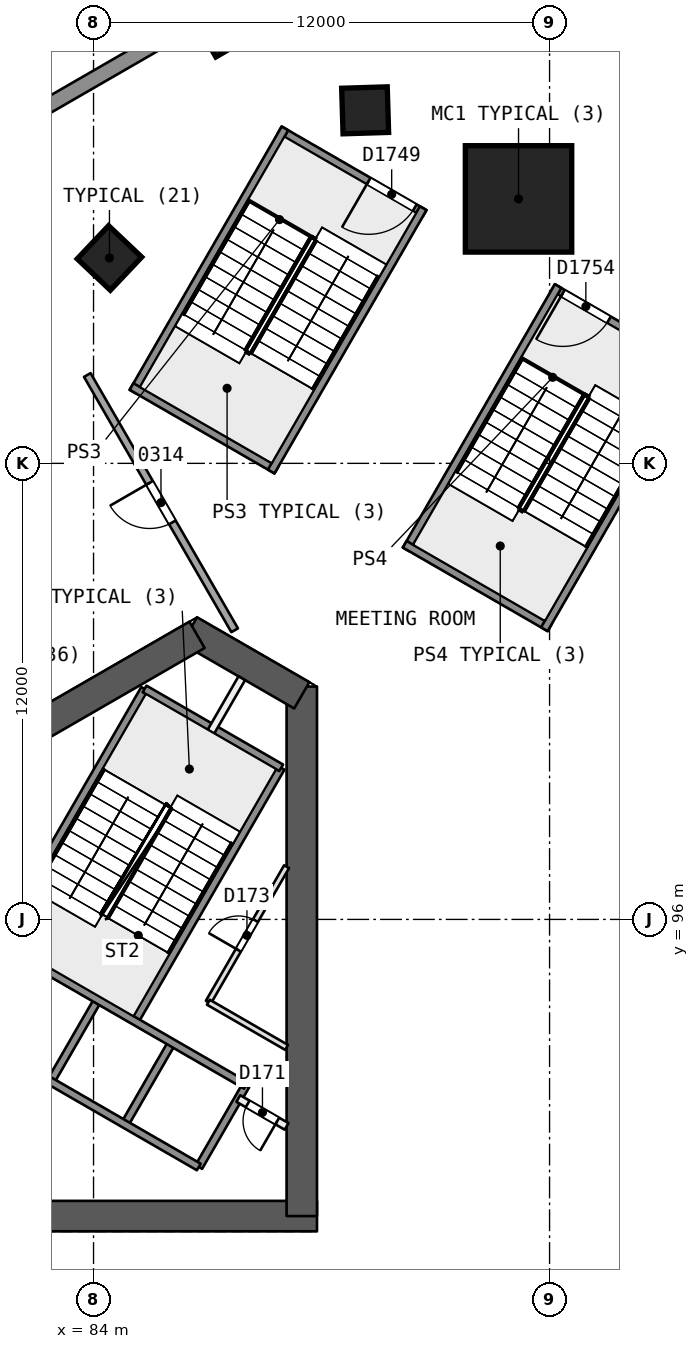
"""IFC4 building model, lengths in metres.
Left out: names, types, materials, properties, quantities, classifications, styles, units other than length and angle.
Written with IfcOpenShell. Run it as: python <this file> out.ifc"""

import sys

from ifc_helpers import new_model, si_unit, direction, frame, frame_2d, origin, origin_2d, place, context, subcontext, project, spatial, rectangle, extrude, element, fill, save


model = new_model("IFC4")
c1 = context("Model", 3, precision=1e-05, world=origin(), true_north=direction((0.0, 1.0)))
c2 = subcontext(c1, "Body", "Model", "MODEL_VIEW")
j1 = project(units=[si_unit("LENGTHUNIT", "METRE"), si_unit("PLANEANGLEUNIT", "RADIAN")], contexts=[c1])
p1 = place(None, origin())
s1 = spatial("IfcSite", under=j1, at=p1, CompositionType="ELEMENT")
p2 = place(p1, origin())
s2 = spatial("IfcBuilding", under=s1, at=p2, CompositionType="ELEMENT")
p3 = place(p2, frame((0.0, 0.0, 20.4)))
s3 = spatial("IfcBuildingStorey", under=s2, at=p3, CompositionType="ELEMENT", Elevation=20.4)
p4 = place(p3, frame((79.731, 88.194, 0.0), z_axis=(0.0, 0.0, 1.0), x_axis=(1.0, 0.0, 0.0)))
e1 = element("IfcWall", 1, at=p4, inside=s3, PredefinedType="SHEAR", context=c2, shape_type="SweptSolid", body=[
    extrude(rectangle(XDim=10.149, YDim=0.8, at=frame_2d((5.074, 0.0))), origin(), (0.0, 0.0, 1.0), 5.0),
])
p5 = place(p4, frame((0.719, 0.0, 0.0)))
e2 = element("IfcOpeningElement", 2, at=p5, cuts=e1, PredefinedType="OPENING", context=c2, shape_type="SweptSolid", body=[
    extrude(rectangle(XDim=1.2, YDim=2.1, at=frame_2d((0.6, 1.05))), frame((0.0, 0.411, 0.0), z_axis=(0.0, -1.0, 0.0), x_axis=(1.0, 0.0, 0.0)), (0.0, 0.0, 1.0), 0.821),
])
p6 = place(p3, frame((89.48, 88.194, 0.0), z_axis=(0.0, 0.0, 1.0), x_axis=(0.0, 1.0, 0.0)))
e3 = element("IfcWall", 3, at=p6, inside=s3, PredefinedType="SHEAR", context=c2, shape_type="SweptSolid", body=[
    extrude(rectangle(XDim=13.933, YDim=0.8, at=frame_2d((6.967, 0.0))), origin(), (0.0, 0.0, 1.0), 5.0),
])
p7 = place(p3, frame((89.48, 101.897, 0.0), z_axis=(0.0, 0.0, 1.0), x_axis=(-0.866034355626, 0.499984494636, 0.0)))
e4 = element("IfcWall", 4, at=p7, inside=s3, PredefinedType="SHEAR", context=c2, shape_type="SweptSolid", body=[
    extrude(rectangle(XDim=3.414, YDim=0.8, at=frame_2d((1.707, 0.0))), origin(), (0.0, 0.0, 1.0), 5.0),
])
p8 = place(p3, frame((86.723, 103.488, 0.0), z_axis=(0.0, 0.0, 1.0), x_axis=(-0.866032504327, -0.499987701298, 0.0)))
e5 = element("IfcWall", 5, at=p8, inside=s3, PredefinedType="SHEAR", context=c2, shape_type="SweptSolid", body=[
    extrude(rectangle(XDim=14.102, YDim=0.8, at=frame_2d((7.051, 0.0))), origin(), (0.0, 0.0, 1.0), 5.0),
])
p9 = place(p3, frame((95.205, 114.995, 0.0), z_axis=(-0.017616042888, -0.030449891307, 0.999381048025), x_axis=(0.500455871665, 0.865047050552, 0.035178414512)))
e6 = element("IfcColumn", 6, at=p9, inside=s3, PredefinedType="COLUMN", context=c2, shape_type="SweptSolid", body=[
    extrude(rectangle(XDim=2.8, YDim=2.8, at=origin_2d()), origin(), (0.0, 0.0, 1.0), 5.003),
])
p10 = place(p3, frame((84.429, 113.438, 0.0), z_axis=(-0.008346006845, -0.02816167222, 0.999568539115), x_axis=(0.865361094771, 0.500694642662, 0.021331911915)))
e7 = element("IfcColumn", 7, at=p10, inside=s3, PredefinedType="COLUMN", context=c2, shape_type="SweptSolid", body=[
    extrude(rectangle(XDim=1.2, YDim=1.2, at=origin_2d()), origin(), (0.0, 0.0, 1.0), 5.002),
])
p11 = place(p3, frame((91.165, 117.327, 0.0), z_axis=(-0.015029655569, -0.032011214459, 0.999374500176), x_axis=(0.917798988767, -0.397043875333, 0.001085024723)))
e8 = element("IfcColumn", 8, at=p11, inside=s3, PredefinedType="COLUMN", context=c2, shape_type="SweptSolid", body=[
    extrude(rectangle(XDim=1.2, YDim=1.2, at=origin_2d()), origin(), (0.0, 0.0, 1.0), 5.003),
])
p12 = place(p3, frame((87.348, 119.172, 0.0), z_axis=(0.0, 0.0, 1.0), x_axis=(0.866025403784, 0.5, 0.0)))
e9 = element("IfcColumn", 9, at=p12, inside=s3, PredefinedType="COLUMN", context=c2, shape_type="SweptSolid", body=[
    extrude(rectangle(XDim=0.7, YDim=0.7, at=origin_2d()), origin(), (0.0, 0.0, 1.0), 5.0),
])
p13 = place(p3, frame((87.714, 103.608, 0.0), z_axis=(0.0, 0.0, 1.0), x_axis=(-0.500002221596, 0.866024121142, 0.0)))
e10 = element("IfcWall", 10, at=p13, inside=s3, PredefinedType="PARTITIONING", context=c2, shape_type="SweptSolid", body=[
    extrude(rectangle(XDim=7.755, YDim=0.2, at=frame_2d((3.878, 0.0))), origin(), (0.0, 0.0, 1.0), 4.5),
])
p14 = place(p13, frame((3.278, 0.0, 0.0)))
e11 = element("IfcOpeningElement", 11, at=p14, cuts=e10, PredefinedType="OPENING", context=c2, shape_type="SweptSolid", body=[
    extrude(rectangle(XDim=1.2, YDim=2.4, at=frame_2d((0.6, 1.2))), frame((0.0, 0.11, 0.0), z_axis=(0.0, -1.0, 0.0), x_axis=(1.0, 0.0, 0.0)), (0.0, 0.0, 1.0), 0.221),
])
p15 = place(p3, frame((26.66, 85.0, 0.0), z_axis=(0.0, 0.0, 1.0), x_axis=(0.866025599265, 0.499999661418, 0.0)))
e12 = element("IfcWall", 12, at=p15, inside=s3, PredefinedType="SOLIDWALL", context=c2, shape_type="SweptSolid", body=[
    extrude(rectangle(XDim=78.727, YDim=0.4, at=frame_2d((39.364, 0.0))), origin(), (0.0, 0.0, 1.0), 4.5),
])
p16 = place(p15, frame((42.84, 0.0, 0.9)))
e13 = element("IfcOpeningElement", 13, at=p16, cuts=e12, PredefinedType="OPENING", context=c2, shape_type="SweptSolid", body=[
    extrude(rectangle(XDim=2.4, YDim=2.4, at=frame_2d((1.2, 1.2))), frame((0.0, 0.21, 0.0), z_axis=(0.0, -1.0, 0.0), x_axis=(1.0, 0.0, 0.0)), (0.0, 0.0, 1.0), 0.421),
])
p17 = place(p15, frame((37.385, 0.0, 0.9)))
e14 = element("IfcOpeningElement", 14, at=p17, cuts=e12, PredefinedType="OPENING", context=c2, shape_type="SweptSolid", body=[
    extrude(rectangle(XDim=2.4, YDim=2.4, at=frame_2d((1.2, 1.2))), frame((0.0, 0.21, 0.0), z_axis=(0.0, -1.0, 0.0), x_axis=(1.0, 0.0, 0.0)), (0.0, 0.0, 1.0), 0.421),
])
p18 = place(p15, frame((32.708, 0.0, 0.9)))
e15 = element("IfcOpeningElement", 15, at=p18, cuts=e12, PredefinedType="OPENING", context=c2, shape_type="SweptSolid", body=[
    extrude(rectangle(XDim=2.4, YDim=2.4, at=frame_2d((1.2, 1.2))), frame((0.0, 0.21, 0.0), z_axis=(0.0, -1.0, 0.0), x_axis=(1.0, 0.0, 0.0)), (0.0, 0.0, 1.0), 0.421),
])
p19 = place(p3, frame((86.77, 89.486, 0.0), z_axis=(0.0, 0.0, 1.0), x_axis=(0.499961042966, 0.86604789447, 0.0)))
e16 = element("IfcWall", 16, at=p19, inside=s3, PredefinedType="SOLIDWALL", context=c2, shape_type="SweptSolid", body=[
    extrude(rectangle(XDim=2.48, YDim=0.2, at=frame_2d((1.24, 0.0))), origin(), (0.0, 0.0, 1.0), 4.5),
])
p20 = place(p3, frame((87.021, 93.821, 0.0), z_axis=(0.0, 0.0, 1.0), x_axis=(0.500028662945, 0.866008854593, 0.0)))
e17 = element("IfcWall", 17, at=p20, inside=s3, PredefinedType="PARTITIONING", context=c2, shape_type="SweptSolid", body=[
    extrude(rectangle(XDim=4.118, YDim=0.15, at=frame_2d((2.059, 0.0))), origin(), (0.0, 0.0, 1.0), 4.5),
])
p21 = place(p20, frame((1.582, 0.0, 0.0)))
e18 = element("IfcOpeningElement", 18, at=p21, cuts=e17, PredefinedType="OPENING", context=c2, shape_type="SweptSolid", body=[
    extrude(rectangle(XDim=0.9, YDim=2.1, at=frame_2d((0.45, 1.05))), frame((0.0, 0.085, 0.0), z_axis=(0.0, -1.0, 0.0), x_axis=(1.0, 0.0, 0.0)), (0.0, 0.0, 1.0), 0.171),
])
p22 = place(p3, frame((84.821, 90.611, 0.0), z_axis=(0.0, 0.0, 1.0), x_axis=(0.499961042966, 0.86604789447, 0.0)))
e19 = element("IfcWall", 19, at=p22, inside=s3, PredefinedType="SOLIDWALL", context=c2, shape_type="SweptSolid", body=[
    extrude(rectangle(XDim=2.48, YDim=0.2, at=frame_2d((1.24, 0.0))), origin(), (0.0, 0.0, 1.0), 4.5),
])
p23 = place(p3, frame((85.087, 93.321, 0.0), z_axis=(0.0, 0.0, 1.0), x_axis=(0.500019787375, 0.866013979237, 0.0)))
e20 = element("IfcWall", 20, at=p23, inside=s3, PredefinedType="SOLIDWALL", context=c2, shape_type="SweptSolid", body=[
    extrude(rectangle(XDim=7.7, YDim=0.2, at=frame_2d((3.85, 0.0))), origin(), (0.0, 0.0, 1.0), 4.5),
])
p24 = place(p3, frame((82.873, 91.736, 0.0), z_axis=(0.0, 0.0, 1.0), x_axis=(0.499961042966, 0.86604789447, 0.0)))
e21 = element("IfcWall", 21, at=p24, inside=s3, PredefinedType="SOLIDWALL", context=c2, shape_type="SweptSolid", body=[
    extrude(rectangle(XDim=2.48, YDim=0.2, at=frame_2d((1.24, 0.0))), origin(), (0.0, 0.0, 1.0), 4.5),
])
p25 = place(p3, frame((87.09, 100.94, 0.0), z_axis=(0.0, 0.0, 1.0), x_axis=(0.499956811548, 0.866050337213, 0.0)))
e22 = element("IfcWall", 22, at=p25, inside=s3, PredefinedType="PARTITIONING", context=c2, shape_type="SweptSolid", body=[
    extrude(rectangle(XDim=1.623, YDim=0.2, at=frame_2d((0.812, 0.0))), origin(), (0.0, 0.0, 1.0), 4.5),
])
p26 = place(p3, frame((81.493, 95.396, 0.0), z_axis=(0.0, 0.0, 1.0), x_axis=(0.500006057782, 0.866021906294, 0.0)))
e23 = element("IfcWall", 23, at=p26, inside=s3, PredefinedType="SOLIDWALL", context=c2, shape_type="SweptSolid", body=[
    extrude(rectangle(XDim=7.7, YDim=0.2, at=frame_2d((3.85, 0.0))), origin(), (0.0, 0.0, 1.0), 4.5),
])
p27 = place(p26, frame((0.55, 0.0, 0.0)))
e24 = element("IfcOpeningElement", 24, at=p27, cuts=e23, PredefinedType="OPENING", context=c2, shape_type="SweptSolid", body=[
    extrude(rectangle(XDim=1.1, YDim=2.1, at=frame_2d((0.55, 1.05))), frame((0.0, 0.11, 0.0), z_axis=(0.0, -1.0, 0.0), x_axis=(1.0, 0.0, 0.0)), (0.0, 0.0, 1.0), 0.221),
])
p28 = place(p3, frame((86.77, 89.486, 0.0), z_axis=(0.0, 0.0, 1.0), x_axis=(-0.86601811187, 0.500012629753, 0.0)))
e25 = element("IfcWall", 25, at=p28, inside=s3, PredefinedType="SOLIDWALL", context=c2, shape_type="SweptSolid", body=[
    extrude(rectangle(XDim=10.9, YDim=0.2, at=frame_2d((5.45, 0.0))), origin(), (0.0, 0.0, 1.0), 4.5),
])
p29 = place(p3, frame((89.08, 90.554, 0.0), z_axis=(0.0, 0.0, 1.0), x_axis=(-0.866022048785, 0.500005810984, 0.0)))
e26 = element("IfcWall", 26, at=p29, inside=s3, PredefinedType="PARTITIONING", context=c2, shape_type="SweptSolid", body=[
    extrude(rectangle(XDim=1.467, YDim=0.2, at=frame_2d((0.733, 0.0))), origin(), (0.0, 0.0, 1.0), 4.5),
])
p30 = place(p29, frame((0.283, 0.0, 0.0)))
e27 = element("IfcOpeningElement", 27, at=p30, cuts=e26, PredefinedType="OPENING", context=c2, shape_type="SweptSolid", body=[
    extrude(rectangle(XDim=0.9, YDim=2.1, at=frame_2d((0.45, 1.05))), frame((0.0, 0.11, 0.0), z_axis=(0.0, -1.0, 0.0), x_axis=(1.0, 0.0, 0.0)), (0.0, 0.0, 1.0), 0.221),
])
p31 = place(p3, frame((88.01, 91.634, 0.0), z_axis=(0.0, 0.0, 1.0), x_axis=(-0.866024315419, 0.5000018851, 0.0)))
e28 = element("IfcWall", 28, at=p31, inside=s3, PredefinedType="SOLIDWALL", context=c2, shape_type="SweptSolid", body=[
    extrude(rectangle(XDim=9.0, YDim=0.2, at=frame_2d((4.5, 0.0))), origin(), (0.0, 0.0, 1.0), 4.5),
])
p32 = place(p3, frame((89.08, 92.632, 0.0), z_axis=(0.0, 0.0, 1.0), x_axis=(-0.866041951395, 0.499971337603, 0.0)))
e29 = element("IfcWall", 29, at=p32, inside=s3, PredefinedType="PARTITIONING", context=c2, shape_type="SweptSolid", body=[
    extrude(rectangle(XDim=2.378, YDim=0.15, at=frame_2d((1.189, 0.0))), origin(), (0.0, 0.0, 1.0), 4.5),
])
p33 = place(p3, frame((88.937, 99.99, 0.0), z_axis=(0.0, 0.0, 1.0), x_axis=(-0.866004344652, 0.500036473714, 0.0)))
e30 = element("IfcWall", 30, at=p33, inside=s3, PredefinedType="SOLIDWALL", context=c2, shape_type="SweptSolid", body=[
    extrude(rectangle(XDim=4.15, YDim=0.2, at=frame_2d((2.075, 0.0))), origin(), (0.0, 0.0, 1.0), 4.5),
])
p34 = place(p3, frame((92.711, 114.577, -0.4), z_axis=(0.0, 0.0, 1.0), x_axis=(-0.866032203192, 0.499988222896, 0.0)))
e31 = element("IfcWall", 31, at=p34, inside=s3, PredefinedType="SOLIDWALL", context=c2, shape_type="SweptSolid", body=[
    extrude(rectangle(XDim=4.4, YDim=0.2, at=frame_2d((2.2, 0.0))), origin(), (0.0, 0.0, 1.0), 4.9),
])
p35 = place(p34, frame((0.3, 0.0, 0.4)))
e32 = element("IfcOpeningElement", 32, at=p35, cuts=e31, PredefinedType="OPENING", context=c2, shape_type="SweptSolid", body=[
    extrude(rectangle(XDim=1.4, YDim=2.1, at=frame_2d((0.7, 1.05))), frame((0.0, 0.11, 0.0), z_axis=(0.0, -1.0, 0.0), x_axis=(1.0, 0.0, 0.0)), (0.0, 0.0, 1.0), 0.221),
])
p36 = place(p3, frame((89.037, 116.813, -0.4), z_axis=(0.0, 0.0, 1.0), x_axis=(-0.49999894854, -0.866026010844, 0.0)))
e33 = element("IfcWall", 33, at=p36, inside=s3, PredefinedType="SOLIDWALL", context=c2, shape_type="SweptSolid", body=[
    extrude(rectangle(XDim=8.0, YDim=0.2, at=frame_2d((4.0, 0.0))), origin(), (0.0, 0.0, 1.0), 4.9),
])
p37 = place(p3, frame((85.001, 110.022, -0.4), z_axis=(0.0, 0.0, 1.0), x_axis=(0.866032203192, -0.499988222896, 0.0)))
e34 = element("IfcWall", 34, at=p37, inside=s3, PredefinedType="SOLIDWALL", context=c2, shape_type="SweptSolid", body=[
    extrude(rectangle(XDim=4.4, YDim=0.2, at=frame_2d((2.2, 0.0))), origin(), (0.0, 0.0, 1.0), 4.9),
])
p38 = place(p3, frame((88.675, 107.785, -0.4), z_axis=(0.0, 0.0, 1.0), x_axis=(0.49999894854, 0.866026010844, 0.0)))
e35 = element("IfcWall", 35, at=p38, inside=s3, PredefinedType="SOLIDWALL", context=c2, shape_type="SweptSolid", body=[
    extrude(rectangle(XDim=8.0, YDim=0.2, at=frame_2d((4.0, 0.0))), origin(), (0.0, 0.0, 1.0), 4.9),
])
p39 = place(p3, frame((99.899, 110.427, -0.4), z_axis=(0.0, 0.0, 1.0), x_axis=(-0.866018331238, 0.50001224981, 0.0)))
e36 = element("IfcWall", 36, at=p39, inside=s3, PredefinedType="SOLIDWALL", context=c2, shape_type="SweptSolid", body=[
    extrude(rectangle(XDim=4.4, YDim=0.2, at=frame_2d((2.2, 0.0))), origin(), (0.0, 0.0, 1.0), 4.9),
])
p40 = place(p39, frame((2.7, 0.0, 0.4)))
e37 = element("IfcOpeningElement", 37, at=p40, cuts=e36, PredefinedType="OPENING", context=c2, shape_type="SweptSolid", body=[
    extrude(rectangle(XDim=1.4, YDim=2.1, at=frame_2d((0.7, 1.05))), frame((0.0, 0.11, 0.0), z_axis=(0.0, -1.0, 0.0), x_axis=(1.0, 0.0, 0.0)), (0.0, 0.0, 1.0), 0.221),
])
p41 = place(p3, frame((96.225, 112.663, -0.4), z_axis=(0.0, 0.0, 1.0), x_axis=(-0.49999894854, -0.866026010844, 0.0)))
e38 = element("IfcWall", 38, at=p41, inside=s3, PredefinedType="SOLIDWALL", context=c2, shape_type="SweptSolid", body=[
    extrude(rectangle(XDim=8.0, YDim=0.2, at=frame_2d((4.0, 0.0))), origin(), (0.0, 0.0, 1.0), 4.9),
])
p42 = place(p3, frame((92.189, 105.872, -0.4), z_axis=(0.0, 0.0, 1.0), x_axis=(0.866032203192, -0.499988222896, 0.0)))
e39 = element("IfcWall", 39, at=p42, inside=s3, PredefinedType="SOLIDWALL", context=c2, shape_type="SweptSolid", body=[
    extrude(rectangle(XDim=4.4, YDim=0.2, at=frame_2d((2.2, 0.0))), origin(), (0.0, 0.0, 1.0), 4.9),
])
p43 = place(p3, frame((95.863, 103.635, -0.4), z_axis=(0.0, 0.0, 1.0), x_axis=(0.49999894854, 0.866026010844, 0.0)))
e40 = element("IfcWall", 40, at=p43, inside=s3, PredefinedType="SOLIDWALL", context=c2, shape_type="SweptSolid", body=[
    extrude(rectangle(XDim=8.0, YDim=0.2, at=frame_2d((4.0, 0.0))), origin(), (0.0, 0.0, 1.0), 4.9),
])
p44 = place(p14, origin())
e41 = element("IfcDoor", 41, at=p44, inside=s3, OperationType="SINGLE_SWING_RIGHT", PredefinedType="NOTDEFINED", context=c2, shape_type="SweptSolid", body=[
    extrude(rectangle(XDim=1.2, YDim=2.4, at=frame_2d((0.6, 1.2))), frame((0.0, 0.025, 0.0), z_axis=(0.0, -1.0, 0.0), x_axis=(1.0, 0.0, 0.0)), (0.0, 0.0, 1.0), 0.05),
])
fill(e11, e41)
p45 = place(p30, origin())
e42 = element("IfcDoor", 42, at=p45, inside=s3, OperationType="SINGLE_SWING_LEFT", PredefinedType="NOTDEFINED", context=c2, shape_type="SweptSolid", body=[
    extrude(rectangle(XDim=0.9, YDim=2.1, at=frame_2d((0.45, 1.05))), frame((0.0, 0.025, 0.0), z_axis=(0.0, -1.0, 0.0), x_axis=(1.0, 0.0, 0.0)), (0.0, 0.0, 1.0), 0.05),
])
fill(e27, e42)
p46 = place(p21, origin())
e43 = element("IfcDoor", 43, at=p46, inside=s3, OperationType="SINGLE_SWING_LEFT", PredefinedType="NOTDEFINED", context=c2, shape_type="SweptSolid", body=[
    extrude(rectangle(XDim=0.9, YDim=2.1, at=frame_2d((0.45, 1.05))), frame((0.0, 0.025, 0.0), z_axis=(0.0, -1.0, 0.0), x_axis=(1.0, 0.0, 0.0)), (0.0, 0.0, 1.0), 0.05),
])
fill(e18, e43)
p47 = place(p35, origin())
e44 = element("IfcDoor", 44, at=p47, inside=s3, OperationType="SINGLE_SWING_RIGHT", PredefinedType="NOTDEFINED", context=c2, shape_type="SweptSolid", body=[
    extrude(rectangle(XDim=1.4, YDim=2.1, at=frame_2d((0.7, 1.05))), frame((0.0, 0.025, 0.0), z_axis=(0.0, -1.0, 0.0), x_axis=(1.0, 0.0, 0.0)), (0.0, 0.0, 1.0), 0.05),
])
fill(e32, e44)
p48 = place(p40, origin())
e45 = element("IfcDoor", 45, at=p48, inside=s3, OperationType="SINGLE_SWING_RIGHT", PredefinedType="NOTDEFINED", context=c2, shape_type="SweptSolid", body=[
    extrude(rectangle(XDim=1.4, YDim=2.1, at=frame_2d((0.7, 1.05))), frame((0.0, 0.025, 0.0), z_axis=(0.0, -1.0, 0.0), x_axis=(1.0, 0.0, 0.0)), (0.0, 0.0, 1.0), 0.05),
])
fill(e37, e45)
save(model, sys.argv[1])
